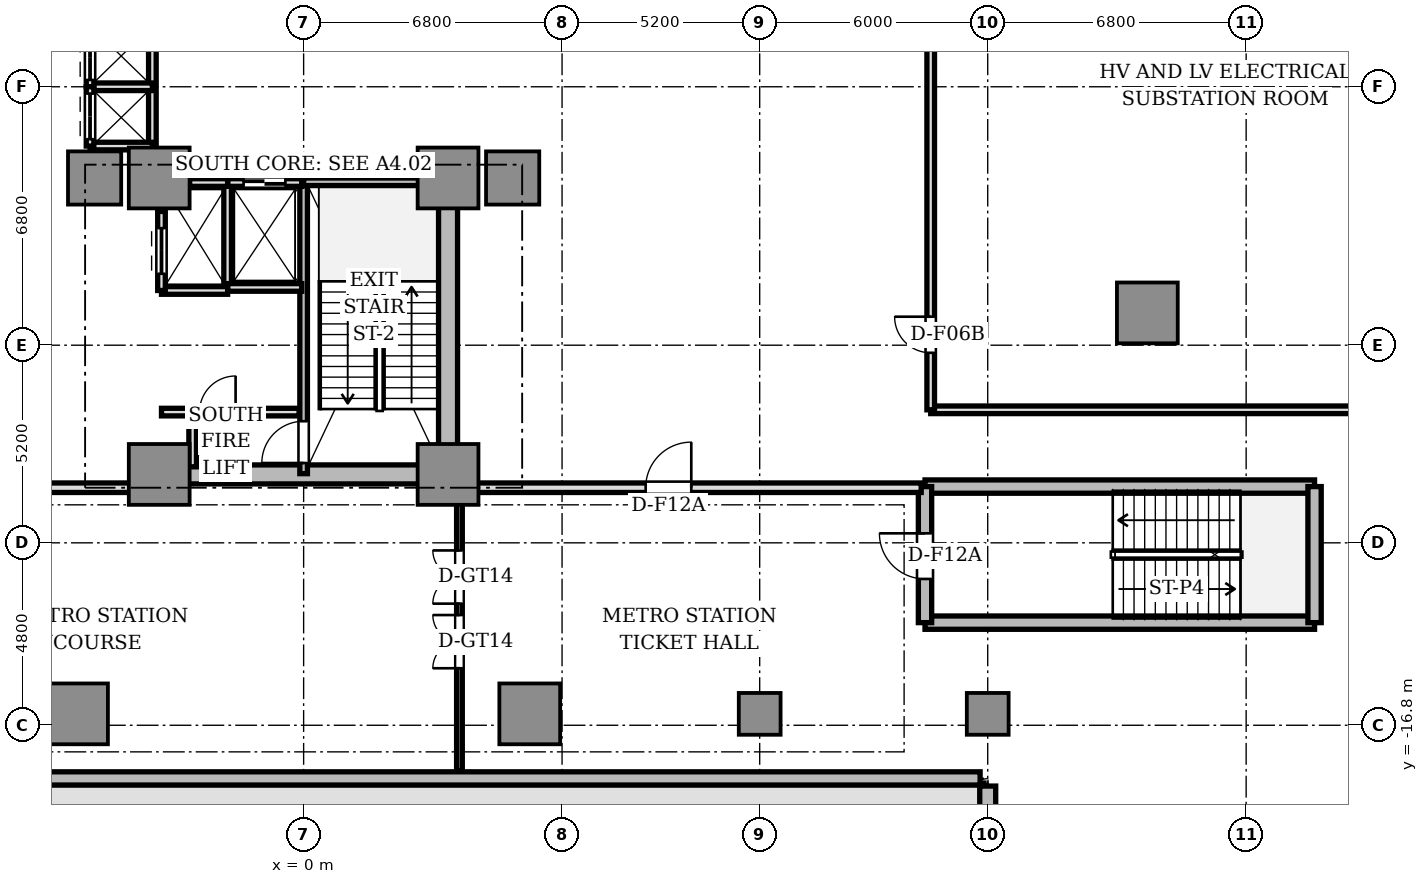
"""IFC4 building model, lengths in metres.
Left out: names, types, materials, properties, quantities, classifications, styles, units other than length and angle.
Written with IfcOpenShell. Run it as: python <this file> out.ifc"""

import sys

from ifc_helpers import new_model, si_unit, direction, frame, frame_2d, origin, origin_2d, place, context, subcontext, project, spatial, rectangle, circle, extrude, source, transform, mapped, element, fill, save


model = new_model("IFC4")
c1 = context("Model", 3, precision=1e-05, world=origin(), true_north=direction((0.0, 1.0)))
c2 = subcontext(c1, "Body", "Model", "MODEL_VIEW")
j1 = project(units=[si_unit("LENGTHUNIT", "METRE"), si_unit("PLANEANGLEUNIT", "RADIAN")], contexts=[c1])
p1 = place(None, origin())
s1 = spatial("IfcSite", under=j1, at=p1, CompositionType="ELEMENT")
p2 = place(p1, origin())
s2 = spatial("IfcBuilding", under=s1, at=p2, CompositionType="ELEMENT")
p3 = place(p2, frame((0.0, 0.0, -4.5)))
s3 = spatial("IfcBuildingStorey", under=s2, at=p3, CompositionType="ELEMENT", Elevation=-4.5)
p4 = place(p3, frame((-3.55, -10.2, 0.0), z_axis=(0.0, 0.0, 1.0), x_axis=(1.0, 0.0, 0.0)))
e1 = element("IfcWall", 1, at=p4, inside=s3, PredefinedType="SHEAR", context=c2, shape_type="SweptSolid", body=[
    extrude(rectangle(XDim=7.1, YDim=0.5, at=frame_2d((3.55, 0.0))), origin(), (0.0, 0.0, 1.0), 4.1),
])
p5 = place(p3, frame((3.8, -9.75, 0.0), z_axis=(0.0, 0.0, 1.0), x_axis=(0.0, 1.0, 0.0)))
e2 = element("IfcWall", 2, at=p5, inside=s3, PredefinedType="SHEAR", context=c2, shape_type="SweptSolid", body=[
    extrude(rectangle(XDim=6.9, YDim=0.5, at=frame_2d((3.45, 0.0))), origin(), (0.0, 0.0, 1.0), 4.1),
])
m1 = source(origin(), c2, "Body", "SweptSolid", [
    extrude(rectangle(XDim=1.6, YDim=1.6, at=origin_2d()), origin(), (0.0, 0.0, 1.0), 4.1),
])
for number, where, z_axis, x_axis in (
    (3, (-3.8, -2.4, 0.0), (0.0, 0.0, 1.0), (1.0, 0.0, 0.0)),
    (4, (3.8, -2.4, 0.0), (0.0, 0.0, 1.0), (1.0, 0.0, 0.0)),
    (5, (-3.8, -10.2, 0.0), (0.0, 0.0, 1.0), (1.0, 0.0, 0.0)),
    (6, (3.8, -10.2, 0.0), (0.0, 0.0, 1.0), (1.0, 0.0, 0.0)),
):
    element("IfcColumn", number, at=place(p3, frame(where, z_axis=z_axis, x_axis=x_axis)), inside=s3, PredefinedType="COLUMN", context=c2, shape_type="MappedRepresentation", body=[
        mapped(m1, transform((0.0, 0.0, 0.0), scale=1.0)),
    ])
m2 = source(origin(), c2, "Body", "SweptSolid", [
    extrude(rectangle(XDim=1.4, YDim=1.4, at=origin_2d()), origin(), (0.0, 0.0, 1.0), 4.1),
])
for number, where, z_axis, x_axis in (
    (7, (5.5, -2.4, 0.0), (0.0, 0.0, 1.0), (1.0, 0.0, 0.0)),
    (8, (-5.5, -2.4, 0.0), (0.0, 0.0, 1.0), (1.0, 0.0, 0.0)),
):
    element("IfcColumn", number, at=place(p3, frame(where, z_axis=z_axis, x_axis=x_axis)), inside=s3, PredefinedType="COLUMN", context=c2, shape_type="MappedRepresentation", body=[
        mapped(m2, transform((0.0, 0.0, 0.0), scale=1.0)),
    ])
for number, where, z_axis, x_axis in (
    (9, (22.2, -5.95, 0.0), (0.0, 0.0, 1.0), (1.0, 0.0, 0.0)),
    (10, (-5.95, -16.5, 0.0), (0.0, 0.0, 1.0), (1.0, 0.0, 0.0)),
    (11, (5.95, -16.5, 0.0), (0.0, 0.0, 1.0), (1.0, 0.0, 0.0)),
):
    element("IfcColumn", number, at=place(p3, frame(where, z_axis=z_axis, x_axis=x_axis)), inside=s3, PredefinedType="COLUMN", context=c2, shape_type="MappedRepresentation", body=[
        mapped(m1, transform((0.0, 0.0, 0.0), scale=1.0)),
    ])
m3 = source(origin(), c2, "Body", "SweptSolid", [
    extrude(circle(Radius=0.55, at=origin_2d()), origin(), (0.0, 0.0, 1.0), 4.1),
])
for number, where, z_axis, x_axis in (
    (12, (12.0, -16.5, 0.0), (0.0, 0.0, 1.0), (1.0, 0.0, 0.0)),
    (13, (18.0, -16.5, 0.0), (0.0, 0.0, 1.0), (1.0, 0.0, 0.0)),
):
    element("IfcColumn", number, at=place(p3, frame(where, z_axis=z_axis, x_axis=x_axis)), inside=s3, PredefinedType="COLUMN", context=c2, shape_type="MappedRepresentation", body=[
        mapped(m3, transform((0.0, 0.0, 0.0), scale=1.0)),
    ])
p6 = place(p3, frame((18.0, -25.0, 0.0), z_axis=(0.0, 0.0, 1.0), x_axis=(0.0, 1.0, 0.0)))
e14 = element("IfcWall", 14, at=p6, inside=s3, PredefinedType="SHEAR", context=c2, shape_type="SweptSolid", body=[
    extrude(rectangle(XDim=6.6, YDim=0.42, at=frame_2d((3.3, 0.0))), origin(), (0.0, 0.0, 1.0), 4.22),
])
p7 = place(p3, frame((-17.8, -18.2, 0.0), z_axis=(0.0, 0.0, 1.0), x_axis=(1.0, 0.0, 0.0)))
e15 = element("IfcWall", 15, at=p7, inside=s3, PredefinedType="SHEAR", context=c2, shape_type="SweptSolid", body=[
    extrude(rectangle(XDim=35.6, YDim=0.35, at=frame_2d((17.8, 0.0))), origin(), (0.0, 0.0, 1.0), 4.22),
])
p8 = place(p3, frame((0.0, -10.18, 0.0), z_axis=(0.0, 0.0, 1.0), x_axis=(0.0, 1.0, 0.0)))
e16 = element("IfcWall", 16, at=p8, inside=s3, PredefinedType="SOLIDWALL", context=c2, shape_type="SweptSolid", body=[
    extrude(rectangle(XDim=7.68, YDim=0.2, at=frame_2d((3.84, 0.0))), origin(), (0.0, 0.0, 1.0), 4.1),
])
p9 = place(p8, frame((0.28, 0.0, 0.0)))
e17 = element("IfcOpeningElement", 17, at=p9, cuts=e16, PredefinedType="OPENING", context=c2, shape_type="SweptSolid", body=[
    extrude(rectangle(XDim=1.1, YDim=2.15, at=frame_2d((0.55, 1.075))), frame((0.0, 0.11, 0.0), z_axis=(0.0, -1.0, 0.0), x_axis=(1.0, 0.0, 0.0)), (0.0, 0.0, 1.0), 0.22),
])
p10 = place(p3, frame((0.0, -2.5, 0.0), z_axis=(0.0, 0.0, 1.0), x_axis=(1.0, 0.0, 0.0)))
e18 = element("IfcWall", 18, at=p10, inside=s3, PredefinedType="SOLIDWALL", context=c2, shape_type="SweptSolid", body=[
    extrude(rectangle(XDim=3.72, YDim=0.2, at=frame_2d((1.86, 0.0))), origin(), (0.0, 0.0, 1.0), 4.1),
])
p11 = place(p3, frame((-2.0, -5.28, 0.0), z_axis=(0.0, 0.0, 1.0), x_axis=(0.0, 1.0, 0.0)))
e19 = element("IfcWall", 19, at=p11, inside=s3, PredefinedType="SOLIDWALL", context=c2, shape_type="SweptSolid", body=[
    extrude(rectangle(XDim=2.78, YDim=0.2, at=frame_2d((1.39, 0.0))), origin(), (0.0, 0.0, 1.0), 3.65),
])
p12 = place(p3, frame((-2.0, -5.28, 0.0), z_axis=(0.0, 0.0, 1.0), x_axis=(1.0, 0.0, 0.0)))
e20 = element("IfcWall", 20, at=p12, inside=s3, PredefinedType="SOLIDWALL", context=c2, shape_type="SweptSolid", body=[
    extrude(rectangle(XDim=1.95, YDim=0.2, at=frame_2d((0.975, 0.0))), origin(), (0.0, 0.0, 1.0), 3.65),
])
p13 = place(p3, frame((-2.0, -2.52, 0.0), z_axis=(0.0, 0.0, 1.0), x_axis=(1.0, 0.0, 0.0)))
e21 = element("IfcWall", 21, at=p13, inside=s3, PredefinedType="SOLIDWALL", context=c2, shape_type="SweptSolid", body=[
    extrude(rectangle(XDim=1.95, YDim=0.2, at=frame_2d((0.975, 0.0))), origin(), (0.0, 0.0, 1.0), 3.65),
])
p14 = place(p13, frame((0.42, 0.0, 0.0)))
e22 = element("IfcOpeningElement", 22, at=p14, cuts=e21, PredefinedType="OPENING", context=c2, shape_type="SweptSolid", body=[
    extrude(rectangle(XDim=1.1, YDim=2.2, at=frame_2d((0.55, 1.1))), frame((0.0, 0.11, 0.0), z_axis=(0.0, -1.0, 0.0), x_axis=(1.0, 0.0, 0.0)), (0.0, 0.0, 1.0), 0.22),
])
p15 = place(p3, frame((-3.0, -2.52, 0.0), z_axis=(0.0, 0.0, 1.0), x_axis=(1.0, 0.0, 0.0)))
e23 = element("IfcWall", 23, at=p15, inside=s3, PredefinedType="SOLIDWALL", context=c2, shape_type="SweptSolid", body=[
    extrude(rectangle(XDim=1.0, YDim=0.2, at=frame_2d((0.5, 0.0))), origin(), (0.0, 0.0, 1.0), 3.65),
])
p16 = place(p3, frame((-3.74, -5.36, 0.0), z_axis=(0.0, 0.0, 1.0), x_axis=(1.0, 0.0, 0.0)))
e24 = element("IfcWall", 24, at=p16, inside=s3, PredefinedType="SOLIDWALL", context=c2, shape_type="SweptSolid", body=[
    extrude(rectangle(XDim=1.74, YDim=0.2, at=frame_2d((0.87, 0.0))), origin(), (0.0, 0.0, 1.0), 3.65),
])
p17 = place(p3, frame((-3.74, -5.36, 0.0), z_axis=(0.0, 0.0, 1.0), x_axis=(0.0, 1.0, 0.0)))
e25 = element("IfcWall", 25, at=p17, inside=s3, PredefinedType="SOLIDWALL", context=c2, shape_type="SweptSolid", body=[
    extrude(rectangle(XDim=2.08, YDim=0.2, at=frame_2d((1.04, 0.0))), origin(), (0.0, 0.0, 1.0), 3.65),
])
p18 = place(p17, frame((0.44, 0.0, 0.0)))
e26 = element("IfcOpeningElement", 26, at=p18, cuts=e25, PredefinedType="OPENING", context=c2, shape_type="SweptSolid", body=[
    extrude(rectangle(XDim=1.2, YDim=2.2, at=frame_2d((0.6, 1.1))), frame((0.0, 0.11, 0.0), z_axis=(0.0, -1.0, 0.0), x_axis=(1.0, 0.0, 0.0)), (0.0, 0.0, 1.0), 0.22),
])
p19 = place(p3, frame((-3.98, -1.56, 0.0), z_axis=(0.0, 0.0, 1.0), x_axis=(0.0, 1.0, 0.0)))
e27 = element("IfcWall", 27, at=p19, inside=s3, PredefinedType="SOLIDWALL", context=c2, shape_type="SweptSolid", body=[
    extrude(rectangle(XDim=3.12, YDim=0.2, at=frame_2d((1.56, 0.0))), origin(), (0.0, 0.0, 1.0), 3.17),
])
for number, where, z_axis, x_axis in (
    (28, (-5.62, -1.56, 0.0), (0.0, 0.0, 1.0), (1.0, 0.0, 0.0)),
    (29, (-5.62, 0.0, 0.0), (0.0, 0.0, 1.0), (1.0, 0.0, 0.0)),
):
    element("IfcWall", number, at=place(p3, frame(where, z_axis=z_axis, x_axis=x_axis)), inside=s3, PredefinedType="SOLIDWALL", context=c2, shape_type="SweptSolid", body=[
        extrude(rectangle(XDim=1.64, YDim=0.2, at=frame_2d((0.82, 0.0))), origin(), (0.0, 0.0, 1.0), 3.65),
    ])
p20 = place(p3, frame((-5.62, 0.0, 0.0), z_axis=(0.0, 0.0, 1.0), x_axis=(0.0, 1.0, 0.0)))
e30 = element("IfcWall", 30, at=p20, inside=s3, PredefinedType="SOLIDWALL", context=c2, shape_type="SweptSolid", body=[
    extrude(rectangle(XDim=1.56, YDim=0.2, at=frame_2d((0.78, 0.0))), origin(), (0.0, 0.0, 1.0), 3.65),
])
p21 = place(p20, frame((0.18, 0.0, 0.0)))
e31 = element("IfcOpeningElement", 31, at=p21, cuts=e30, PredefinedType="OPENING", context=c2, shape_type="SweptSolid", body=[
    extrude(rectangle(XDim=1.2, YDim=2.2, at=frame_2d((0.6, 1.1))), frame((0.0, 0.11, 0.0), z_axis=(0.0, -1.0, 0.0), x_axis=(1.0, 0.0, 0.0)), (0.0, 0.0, 1.0), 0.22),
])
p22 = place(p3, frame((-5.62, -1.56, 0.0), z_axis=(0.0, 0.0, 1.0), x_axis=(0.0, 1.0, 0.0)))
e32 = element("IfcWall", 32, at=p22, inside=s3, PredefinedType="SOLIDWALL", context=c2, shape_type="SweptSolid", body=[
    extrude(rectangle(XDim=1.56, YDim=0.2, at=frame_2d((0.78, 0.0))), origin(), (0.0, 0.0, 1.0), 3.65),
])
p23 = place(p22, frame((0.18, 0.0, 0.0)))
e33 = element("IfcOpeningElement", 33, at=p23, cuts=e32, PredefinedType="OPENING", context=c2, shape_type="SweptSolid", body=[
    extrude(rectangle(XDim=1.2, YDim=2.2, at=frame_2d((0.6, 1.1))), frame((0.0, 0.11, 0.0), z_axis=(0.0, -1.0, 0.0), x_axis=(1.0, 0.0, 0.0)), (0.0, 0.0, 1.0), 0.22),
])
p24 = place(p3, frame((-3.74, -8.56, 0.0), z_axis=(0.0, 0.0, 1.0), x_axis=(1.0, 0.0, 0.0)))
e34 = element("IfcWall", 34, at=p24, inside=s3, PredefinedType="SOLIDWALL", context=c2, shape_type="SweptSolid", body=[
    extrude(rectangle(XDim=3.62, YDim=0.2, at=frame_2d((1.81, 0.0))), origin(), (0.0, 0.0, 1.0), 3.65),
])
p25 = place(p24, frame((1.0, 0.0, 0.0)))
e35 = element("IfcOpeningElement", 35, at=p25, cuts=e34, PredefinedType="OPENING", context=c2, shape_type="SweptSolid", body=[
    extrude(rectangle(XDim=0.95, YDim=2.15, at=frame_2d((0.475, 1.075))), frame((0.0, 0.11, 0.0), z_axis=(0.0, -1.0, 0.0), x_axis=(1.0, 0.0, 0.0)), (0.0, 0.0, 1.0), 0.22),
])
p26 = place(p3, frame((-2.92, -10.0, 0.0), z_axis=(0.0, 0.0, 1.0), x_axis=(0.0, 1.0, 0.0)))
e36 = element("IfcWall", 36, at=p26, inside=s3, PredefinedType="SOLIDWALL", context=c2, shape_type="SweptSolid", body=[
    extrude(rectangle(XDim=1.44, YDim=0.2, at=frame_2d((0.72, 0.0))), origin(), (0.0, 0.0, 1.0), 3.65),
])
for number, where, z_axis, x_axis in (
    (37, (16.35, -10.52, 0.0), (0.0, 0.0, 1.0), (1.0, 0.0, 0.0)),
    (38, (16.35, -14.1, 0.0), (0.0, 0.0, 1.0), (1.0, 0.0, 0.0)),
):
    element("IfcWall", number, at=place(p3, frame(where, z_axis=z_axis, x_axis=x_axis)), inside=s3, PredefinedType="SHEAR", context=c2, shape_type="SweptSolid", body=[
        extrude(rectangle(XDim=10.25, YDim=0.35, at=frame_2d((5.125, 0.0))), origin(), (0.0, 0.0, 1.0), 4.1),
    ])
p27 = place(p3, frame((16.35, -14.1, 0.0), z_axis=(0.0, 0.0, 1.0), x_axis=(0.0, 1.0, 0.0)))
e39 = element("IfcWall", 39, at=p27, inside=s3, PredefinedType="SHEAR", context=c2, shape_type="SweptSolid", body=[
    extrude(rectangle(XDim=3.58, YDim=0.35, at=frame_2d((1.79, 0.0))), origin(), (0.0, 0.0, 1.0), 4.1),
])
p28 = place(p27, frame((1.15, 0.0, 0.0)))
e40 = element("IfcOpeningElement", 40, at=p28, cuts=e39, PredefinedType="OPENING", context=c2, shape_type="SweptSolid", body=[
    extrude(rectangle(XDim=1.2, YDim=2.2, at=frame_2d((0.6, 1.1))), frame((0.0, 0.185, 0.0), z_axis=(0.0, -1.0, 0.0), x_axis=(1.0, 0.0, 0.0)), (0.0, 0.0, 1.0), 0.37),
])
p29 = place(p3, frame((26.6, -14.1, 0.0), z_axis=(0.0, 0.0, 1.0), x_axis=(0.0, 1.0, 0.0)))
e41 = element("IfcWall", 41, at=p29, inside=s3, PredefinedType="SHEAR", context=c2, shape_type="SweptSolid", body=[
    extrude(rectangle(XDim=3.58, YDim=0.35, at=frame_2d((1.79, 0.0))), origin(), (0.0, 0.0, 1.0), 4.1),
])
p30 = place(p3, frame((-16.25, -10.55, 0.0), z_axis=(0.0, 0.0, 1.0), x_axis=(1.0, 0.0, 0.0)))
e42 = element("IfcWall", 42, at=p30, inside=s3, PredefinedType="SOLIDWALL", context=c2, shape_type="SweptSolid", body=[
    extrude(rectangle(XDim=12.25, YDim=0.25, at=frame_2d((6.125, 0.0))), origin(), (0.0, 0.0, 1.0), 3.65),
])
p31 = place(p30, frame((5.0, 0.0, 0.0)))
e43 = element("IfcOpeningElement", 43, at=p31, cuts=e42, PredefinedType="OPENING", context=c2, shape_type="SweptSolid", body=[
    extrude(rectangle(XDim=1.2, YDim=2.2, at=frame_2d((0.6, 1.1))), frame((0.0, 0.135, 0.0), z_axis=(0.0, -1.0, 0.0), x_axis=(1.0, 0.0, 0.0)), (0.0, 0.0, 1.0), 0.27),
])
p32 = place(p3, frame((4.0, -10.55, 0.0), z_axis=(0.0, 0.0, 1.0), x_axis=(1.0, 0.0, 0.0)))
e44 = element("IfcWall", 44, at=p32, inside=s3, PredefinedType="SOLIDWALL", context=c2, shape_type="SweptSolid", body=[
    extrude(rectangle(XDim=12.25, YDim=0.25, at=frame_2d((6.125, 0.0))), origin(), (0.0, 0.0, 1.0), 3.65),
])
p33 = place(p32, frame((5.0, 0.0, 0.0)))
e45 = element("IfcOpeningElement", 45, at=p33, cuts=e44, PredefinedType="OPENING", context=c2, shape_type="SweptSolid", body=[
    extrude(rectangle(XDim=1.2, YDim=2.2, at=frame_2d((0.6, 1.1))), frame((0.0, 0.135, 0.0), z_axis=(0.0, -1.0, 0.0), x_axis=(1.0, 0.0, 0.0)), (0.0, 0.0, 1.0), 0.27),
])
p34 = place(p3, frame((4.1, -18.0, 0.0), z_axis=(0.0, 0.0, 1.0), x_axis=(0.0, 1.0, 0.0)))
e46 = element("IfcWall", 46, at=p34, inside=s3, PredefinedType="PARTITIONING", context=c2, shape_type="SweptSolid", body=[
    extrude(rectangle(XDim=7.45, YDim=0.15, at=frame_2d((3.725, 0.0))), origin(), (0.0, 0.0, 1.0), 3.57),
])
p35 = place(p34, frame((2.7, 0.0, 0.0)))
e47 = element("IfcOpeningElement", 47, at=p35, cuts=e46, PredefinedType="OPENING", context=c2, shape_type="SweptSolid", body=[
    extrude(rectangle(XDim=1.4, YDim=2.1, at=frame_2d((0.7, 1.05))), frame((0.0, 0.085, 0.0), z_axis=(0.0, -1.0, 0.0), x_axis=(1.0, 0.0, 0.0)), (0.0, 0.0, 1.0), 0.17),
])
p36 = place(p34, frame((4.4, 0.0, 0.0)))
e48 = element("IfcOpeningElement", 48, at=p36, cuts=e46, PredefinedType="OPENING", context=c2, shape_type="SweptSolid", body=[
    extrude(rectangle(XDim=1.4, YDim=2.1, at=frame_2d((0.7, 1.05))), frame((0.0, 0.085, 0.0), z_axis=(0.0, -1.0, 0.0), x_axis=(1.0, 0.0, 0.0)), (0.0, 0.0, 1.0), 0.17),
])
p37 = place(p3, frame((16.5, -8.5, 0.0), z_axis=(0.0, 0.0, 1.0), x_axis=(1.0, 0.0, 0.0)))
e49 = element("IfcWall", 49, at=p37, inside=s3, PredefinedType="SOLIDWALL", context=c2, shape_type="SweptSolid", body=[
    extrude(rectangle(XDim=15.5, YDim=0.2, at=frame_2d((7.75, 0.0))), origin(), (0.0, 0.0, 1.0), 3.65),
])
p38 = place(p3, frame((16.5, -8.5, 0.0), z_axis=(0.0, 0.0, 1.0), x_axis=(0.0, 1.0, 0.0)))
e50 = element("IfcWall", 50, at=p38, inside=s3, PredefinedType="SOLIDWALL", context=c2, shape_type="SweptSolid", body=[
    extrude(rectangle(XDim=17.0, YDim=0.2, at=frame_2d((8.5, 0.0))), origin(), (0.0, 0.0, 1.0), 3.65),
])
p39 = place(p38, frame((1.5, 0.0, 0.0)))
e51 = element("IfcOpeningElement", 51, at=p39, cuts=e50, PredefinedType="OPENING", context=c2, shape_type="SweptSolid", body=[
    extrude(rectangle(XDim=0.95, YDim=2.15, at=frame_2d((0.475, 1.075))), frame((0.0, 0.11, 0.0), z_axis=(0.0, -1.0, 0.0), x_axis=(1.0, 0.0, 0.0)), (0.0, 0.0, 1.0), 0.22),
])
m4 = source(origin(), c2, "Body", "SweptSolid", [
    extrude(rectangle(XDim=1.1, YDim=0.05, at=origin_2d()), origin(), (0.0, 0.0, 1.0), 2.2),
])
p40 = place(p14, frame((0.55, 0.0, 0.0)))
e52 = element("IfcDoor", 52, at=p40, inside=s3, OperationType="DOUBLE_DOOR_SLIDING", PredefinedType="DOOR", context=c2, shape_type="MappedRepresentation", body=[
    mapped(m4, transform((0.0, 0.0, 0.0), scale=1.0)),
])
fill(e22, e52)
m5 = source(origin(), c2, "Body", "SweptSolid", [
    extrude(rectangle(XDim=1.2, YDim=0.05, at=origin_2d()), origin(), (0.0, 0.0, 1.0), 2.2),
])
p41 = place(p18, frame((0.6, 0.0, 0.0)))
e53 = element("IfcDoor", 53, at=p41, inside=s3, OperationType="DOUBLE_DOOR_SLIDING", PredefinedType="DOOR", context=c2, shape_type="MappedRepresentation", body=[
    mapped(m5, transform((0.0, 0.0, 0.0), scale=1.0)),
])
fill(e26, e53)
p42 = place(p21, frame((0.6, 0.0, 0.0)))
e54 = element("IfcDoor", 54, at=p42, inside=s3, OperationType="DOUBLE_DOOR_SLIDING", PredefinedType="DOOR", context=c2, shape_type="MappedRepresentation", body=[
    mapped(m5, transform((0.0, 0.0, 0.0), scale=1.0)),
])
fill(e31, e54)
p43 = place(p23, frame((0.6, 0.0, 0.0)))
e55 = element("IfcDoor", 55, at=p43, inside=s3, OperationType="DOUBLE_DOOR_SLIDING", PredefinedType="DOOR", context=c2, shape_type="MappedRepresentation", body=[
    mapped(m5, transform((0.0, 0.0, 0.0), scale=1.0)),
])
fill(e33, e55)
m6 = source(origin(), c2, "Body", "SweptSolid", [
    extrude(rectangle(XDim=1.1, YDim=0.05, at=origin_2d()), origin(), (0.0, 0.0, 1.0), 2.15),
])
p44 = place(p9, frame((0.55, 0.0, 0.0)))
e56 = element("IfcDoor", 56, at=p44, inside=s3, OperationType="SINGLE_SWING_LEFT", PredefinedType="DOOR", context=c2, shape_type="MappedRepresentation", body=[
    mapped(m6, transform((0.0, 0.0, 0.0), scale=1.0)),
])
fill(e17, e56)
m7 = source(origin(), c2, "Body", "SweptSolid", [
    extrude(rectangle(XDim=0.95, YDim=0.05, at=origin_2d()), origin(), (0.0, 0.0, 1.0), 2.15),
])
p45 = place(p25, frame((0.475, 0.0, 0.0)))
e57 = element("IfcDoor", 57, at=p45, inside=s3, OperationType="SINGLE_SWING_RIGHT", PredefinedType="DOOR", context=c2, shape_type="MappedRepresentation", body=[
    mapped(m7, transform((0.0, 0.0, 0.0), scale=1.0)),
])
fill(e35, e57)
p46 = place(p28, frame((0.6, 0.0, 0.0)))
e58 = element("IfcDoor", 58, at=p46, inside=s3, OperationType="SINGLE_SWING_RIGHT", PredefinedType="DOOR", context=c2, shape_type="MappedRepresentation", body=[
    mapped(m5, transform((0.0, 0.0, 0.0), scale=1.0)),
])
fill(e40, e58)
p47 = place(p33, frame((0.6, 0.0, 0.0)))
e59 = element("IfcDoor", 59, at=p47, inside=s3, OperationType="SINGLE_SWING_RIGHT", PredefinedType="DOOR", context=c2, shape_type="MappedRepresentation", body=[
    mapped(m5, transform((0.0, 0.0, 0.0), scale=1.0)),
])
fill(e45, e59)
m8 = source(origin(), c2, "Body", "SweptSolid", [
    extrude(rectangle(XDim=1.4, YDim=0.05, at=origin_2d()), origin(), (0.0, 0.0, 1.0), 2.1),
])
p48 = place(p35, frame((0.7, 0.0, 0.0)))
e60 = element("IfcDoor", 60, at=p48, inside=s3, OperationType="DOUBLE_DOOR_SINGLE_SWING", PredefinedType="GATE", context=c2, shape_type="MappedRepresentation", body=[
    mapped(m8, transform((0.0, 0.0, 0.0), scale=1.0)),
])
fill(e47, e60)
p49 = place(p36, frame((0.7, 0.0, 0.0)))
e61 = element("IfcDoor", 61, at=p49, inside=s3, OperationType="DOUBLE_DOOR_SINGLE_SWING", PredefinedType="GATE", context=c2, shape_type="MappedRepresentation", body=[
    mapped(m8, transform((0.0, 0.0, 0.0), scale=1.0)),
])
fill(e48, e61)
p50 = place(p39, frame((0.475, 0.0, 0.0)))
e62 = element("IfcDoor", 62, at=p50, inside=s3, OperationType="SINGLE_SWING_RIGHT", PredefinedType="DOOR", context=c2, shape_type="MappedRepresentation", body=[
    mapped(m7, transform((0.0, 0.0, 0.0), scale=1.0)),
])
fill(e51, e62)
save(model, sys.argv[1])
